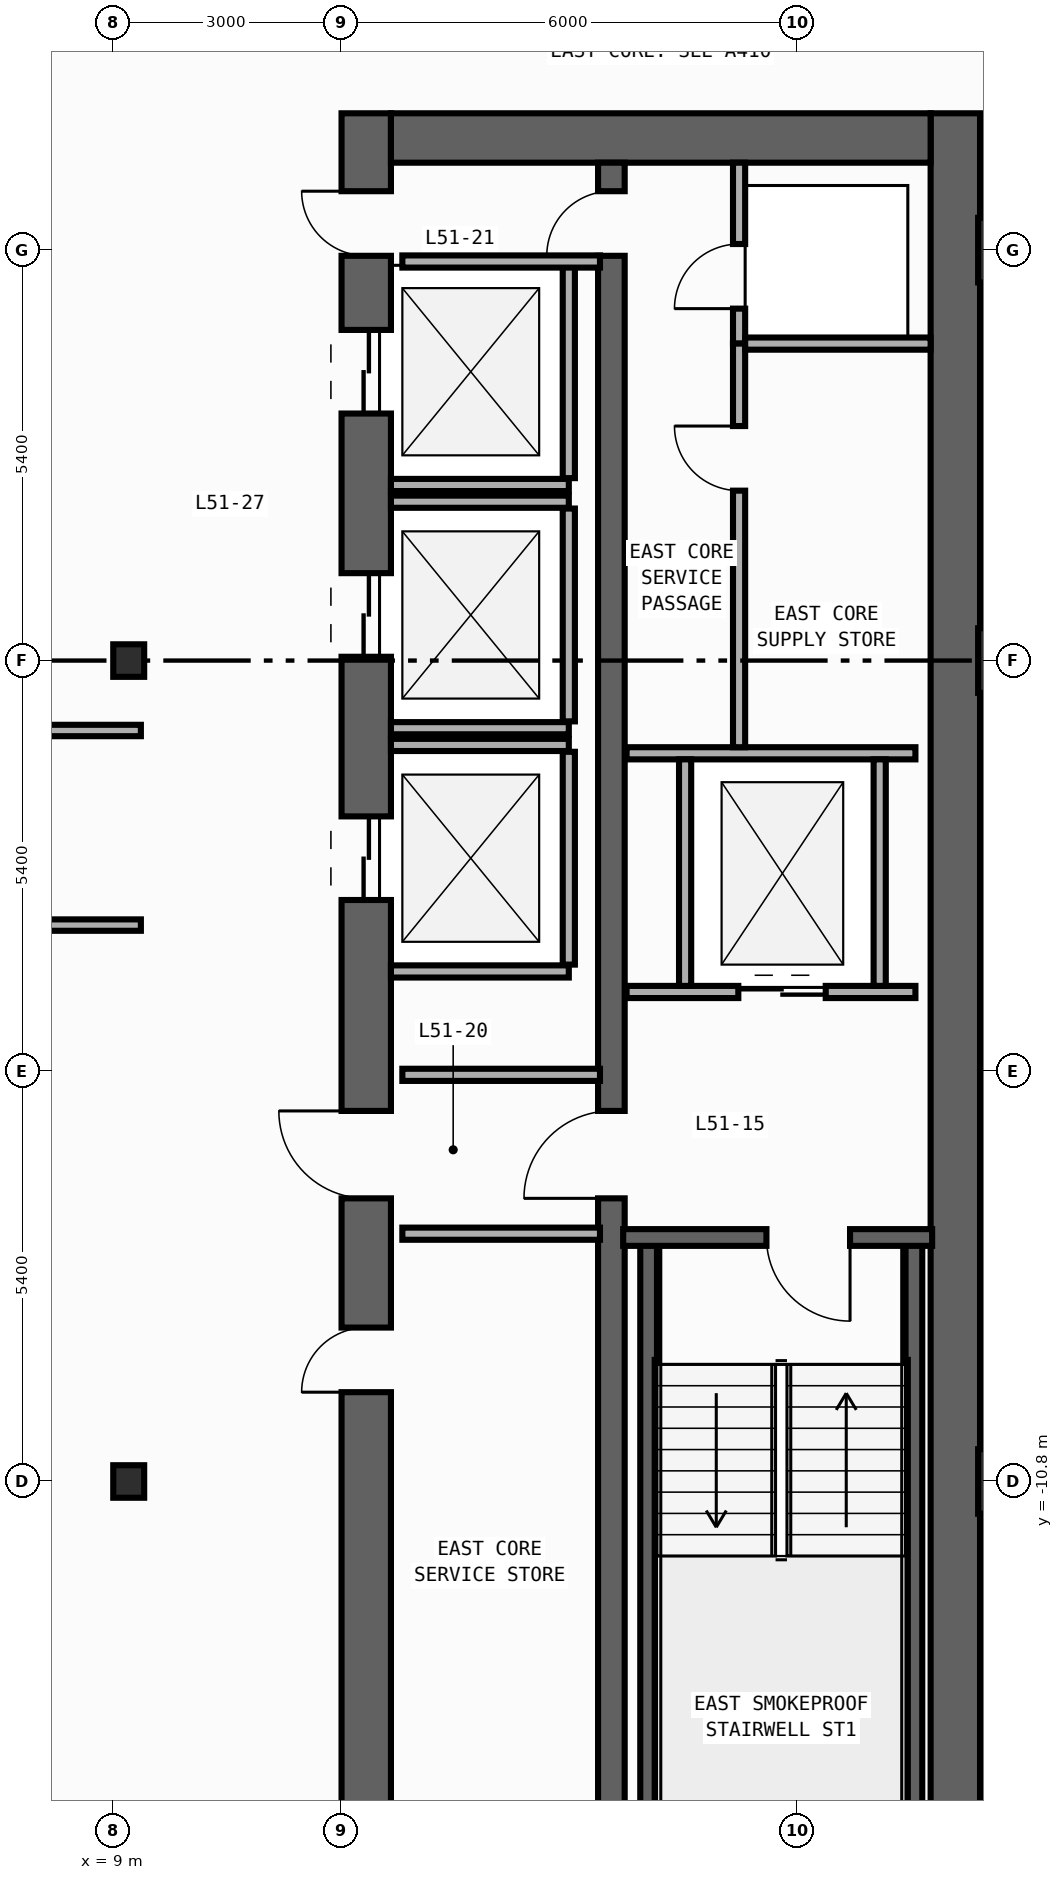
"""IFC4 building model, lengths in metres.
Left out: names, types, materials, properties, quantities, classifications, styles, units other than length and angle.
Written with IfcOpenShell. Run it as: python <this file> out.ifc"""

import sys

from ifc_helpers import new_model, si_unit, direction, frame, frame_2d, origin, origin_2d, place, context, subcontext, project, spatial, rectangle, i_section, extrude, element, fill, save


model = new_model("IFC4")
c1 = context("Model", 3, precision=1e-05, world=origin(), true_north=direction((0.0, 1.0)))
c2 = subcontext(c1, "Body", "Model", "MODEL_VIEW")
j1 = project(units=[si_unit("LENGTHUNIT", "METRE"), si_unit("PLANEANGLEUNIT", "RADIAN")], contexts=[c1])
p1 = place(None, origin())
s1 = spatial("IfcSite", under=j1, at=p1, CompositionType="ELEMENT")
p2 = place(p1, origin())
s2 = spatial("IfcBuilding", under=s1, at=p2, CompositionType="ELEMENT")
p3 = place(p2, frame((0.0, 0.0, 222.4)))
s3 = spatial("IfcBuildingStorey", under=s2, at=p3, CompositionType="ELEMENT", Elevation=222.4)
p4 = place(p3, frame((12.325, -19.8, 0.0), z_axis=(0.0, 0.0, 1.0), x_axis=(0.0, 1.0, 0.0)))
e1 = element("IfcWall", 1, at=p4, inside=s3, PredefinedType="SHEAR", context=c2, shape_type="SweptSolid", body=[
    extrude(rectangle(XDim=27.0, YDim=0.65, at=frame_2d((13.5, 0.0))), origin(), (0.0, 0.0, 1.0), 3.34),
])
p5 = place(p4, frame((23.05, 0.0, 0.0)))
e2 = element("IfcOpeningElement", 2, at=p5, cuts=e1, PredefinedType="OPENING", context=c2, shape_type="SweptSolid", body=[
    extrude(rectangle(XDim=1.1, YDim=2.2, at=frame_2d((0.55, 1.1))), frame((0.0, 0.335, 0.0), z_axis=(0.0, -1.0, 0.0), x_axis=(1.0, 0.0, 0.0)), (0.0, 0.0, 1.0), 0.67),
])
p6 = place(p4, frame((19.85, 0.0, 0.0)))
e3 = element("IfcOpeningElement", 3, at=p6, cuts=e1, PredefinedType="OPENING", context=c2, shape_type="SweptSolid", body=[
    extrude(rectangle(XDim=1.1, YDim=2.2, at=frame_2d((0.55, 1.1))), frame((0.0, 0.335, 0.0), z_axis=(0.0, -1.0, 0.0), x_axis=(1.0, 0.0, 0.0)), (0.0, 0.0, 1.0), 0.67),
])
p7 = place(p4, frame((16.65, 0.0, 0.0)))
e4 = element("IfcOpeningElement", 4, at=p7, cuts=e1, PredefinedType="OPENING", context=c2, shape_type="SweptSolid", body=[
    extrude(rectangle(XDim=1.1, YDim=2.2, at=frame_2d((0.55, 1.1))), frame((0.0, 0.335, 0.0), z_axis=(0.0, -1.0, 0.0), x_axis=(1.0, 0.0, 0.0)), (0.0, 0.0, 1.0), 0.67),
])
p8 = place(p4, frame((10.175, 0.0, 0.0)))
e5 = element("IfcOpeningElement", 5, at=p8, cuts=e1, PredefinedType="OPENING", context=c2, shape_type="SweptSolid", body=[
    extrude(rectangle(XDim=0.85, YDim=2.1, at=frame_2d((0.425, 1.05))), frame((0.0, 0.335, 0.0), z_axis=(0.0, -1.0, 0.0), x_axis=(1.0, 0.0, 0.0)), (0.0, 0.0, 1.0), 0.67),
])
p9 = place(p4, frame((12.725, 0.0, 0.0)))
e6 = element("IfcOpeningElement", 6, at=p9, cuts=e1, PredefinedType="OPENING", context=c2, shape_type="SweptSolid", body=[
    extrude(rectangle(XDim=1.15, YDim=2.2, at=frame_2d((0.575, 1.1))), frame((0.0, 0.335, 0.0), z_axis=(0.0, -1.0, 0.0), x_axis=(1.0, 0.0, 0.0)), (0.0, 0.0, 1.0), 0.67),
])
p10 = place(p4, frame((25.125, 0.0, 0.0)))
e7 = element("IfcOpeningElement", 7, at=p10, cuts=e1, PredefinedType="OPENING", context=c2, shape_type="SweptSolid", body=[
    extrude(rectangle(XDim=0.85, YDim=2.1, at=frame_2d((0.425, 1.05))), frame((0.0, 0.335, 0.0), z_axis=(0.0, -1.0, 0.0), x_axis=(1.0, 0.0, 0.0)), (0.0, 0.0, 1.0), 0.67),
])
p11 = place(p3, frame((20.075, -19.8, 0.0), z_axis=(0.0, 0.0, 1.0), x_axis=(0.0, 1.0, 0.0)))
e8 = element("IfcWall", 8, at=p11, inside=s3, PredefinedType="SHEAR", context=c2, shape_type="SweptSolid", body=[
    extrude(rectangle(XDim=27.0, YDim=0.65, at=frame_2d((13.5, 0.0))), origin(), (0.0, 0.0, 1.0), 3.34),
])
p12 = place(p3, frame((12.65, 6.875, 0.0), z_axis=(0.0, 0.0, 1.0), x_axis=(1.0, 0.0, 0.0)))
e9 = element("IfcWall", 9, at=p12, inside=s3, PredefinedType="SHEAR", context=c2, shape_type="SweptSolid", body=[
    extrude(rectangle(XDim=7.1, YDim=0.65, at=frame_2d((3.55, 0.0))), origin(), (0.0, 0.0, 1.0), 3.34),
])
p13 = place(p3, frame((15.55, -19.15, 0.0), z_axis=(0.0, 0.0, 1.0), x_axis=(0.0, 1.0, 0.0)))
e10 = element("IfcWall", 10, at=p13, inside=s3, PredefinedType="SHEAR", context=c2, shape_type="SweptSolid", body=[
    extrude(rectangle(XDim=25.7, YDim=0.35, at=frame_2d((12.85, 0.0))), origin(), (0.0, 0.0, 1.0), 3.34),
])
p14 = place(p13, frame((12.075, 0.0, 0.0)))
e11 = element("IfcOpeningElement", 11, at=p14, cuts=e10, PredefinedType="OPENING", context=c2, shape_type="SweptSolid", body=[
    extrude(rectangle(XDim=1.15, YDim=2.2, at=frame_2d((0.575, 1.1))), frame((0.0, 0.185, 0.0), z_axis=(0.0, -1.0, 0.0), x_axis=(1.0, 0.0, 0.0)), (0.0, 0.0, 1.0), 0.37),
])
p15 = place(p13, frame((24.475, 0.0, 0.0)))
e12 = element("IfcOpeningElement", 12, at=p15, cuts=e10, PredefinedType="OPENING", context=c2, shape_type="SweptSolid", body=[
    extrude(rectangle(XDim=0.85, YDim=2.1, at=frame_2d((0.425, 1.05))), frame((0.0, 0.185, 0.0), z_axis=(0.0, -1.0, 0.0), x_axis=(1.0, 0.0, 0.0)), (0.0, 0.0, 1.0), 0.37),
])
for number, where, z_axis, x_axis in (
    (13, (16.04, -19.01, 0.0), (0.0, 0.0, 1.0), (0.0, 1.0, 0.0)),
    (14, (19.53, -19.01, 0.0), (0.0, 0.0, 1.0), (0.0, 1.0, 0.0)),
):
    element("IfcWall", number, at=place(p3, frame(where, z_axis=z_axis, x_axis=x_axis)), inside=s3, PredefinedType="SHEAR", context=c2, shape_type="SweptSolid", body=[
        extrude(rectangle(XDim=11.42, YDim=0.22, at=frame_2d((5.71, 0.0))), origin(), (0.0, 0.0, 1.0), 3.34),
    ])
p16 = place(p3, frame((19.77, -7.59, 0.0), z_axis=(0.0, 0.0, 1.0), x_axis=(-1.0, 0.0, 0.0)))
e15 = element("IfcWall", 15, at=p16, inside=s3, PredefinedType="SHEAR", context=c2, shape_type="SweptSolid", body=[
    extrude(rectangle(XDim=4.065, YDim=0.22, at=frame_2d((2.032, 0.0))), origin(), (0.0, 0.0, 1.0), 3.34),
])
p17 = place(p16, frame((1.08, 0.0, 0.0)))
e16 = element("IfcOpeningElement", 16, at=p17, cuts=e15, PredefinedType="OPENING", context=c2, shape_type="SweptSolid", body=[
    extrude(rectangle(XDim=1.1, YDim=2.2, at=frame_2d((0.55, 1.1))), frame((0.0, 0.12, 0.0), z_axis=(0.0, -1.0, 0.0), x_axis=(1.0, 0.0, 0.0)), (0.0, 0.0, 1.0), 0.24),
])
for number, where, z_axis, x_axis in (
    (17, (9.2, -10.8, 0.0), (0.0, 0.0, 1.0), (1.0, 0.0, 0.0)),
    (18, (9.2, 0.0, 0.0), (0.0, 0.0, 1.0), (1.0, 0.0, 0.0)),
):
    element("IfcColumn", number, at=place(p3, frame(where, z_axis=z_axis, x_axis=x_axis)), inside=s3, PredefinedType="COLUMN", context=c2, shape_type="SweptSolid", body=[
        extrude(i_section(OverallWidth=0.407, OverallDepth=0.428, WebThickness=0.02, FlangeThickness=0.035, FilletRadius=0.022, at=origin_2d()), origin(), (0.0, 0.0, 1.0), 3.6),
    ])
for number, where, z_axis, x_axis in (
    (19, (20.8, -10.8, 0.0), (0.0, 0.0, 1.0), (1.0, 0.0, 0.0)),
    (20, (20.8, 0.0, 0.0), (0.0, 0.0, 1.0), (1.0, 0.0, 0.0)),
    (21, (20.8, 5.4, 0.0), (0.0, 0.0, 1.0), (1.0, 0.0, 0.0)),
):
    element("IfcColumn", number, at=place(p3, frame(where, z_axis=z_axis, x_axis=x_axis)), inside=s3, PredefinedType="COLUMN", context=c2, shape_type="SweptSolid", body=[
        extrude(rectangle(XDim=0.85, YDim=0.85, at=origin_2d()), origin(), (0.0, 0.0, 1.0), 3.6),
    ])
p18 = place(p3, frame((12.65, 2.31, 0.0), z_axis=(0.0, 0.0, 1.0), x_axis=(1.0, 0.0, 0.0)))
e22 = element("IfcWall", 22, at=p18, inside=s3, PredefinedType="STANDARD", context=c2, shape_type="SweptSolid", body=[
    extrude(rectangle(XDim=2.34, YDim=0.16, at=frame_2d((1.17, 0.0))), origin(), (0.0, 0.0, 1.0), 3.34),
])
p19 = place(p3, frame((14.99, 2.4, 0.0), z_axis=(0.0, 0.0, 1.0), x_axis=(0.0, 1.0, 0.0)))
e23 = element("IfcWall", 23, at=p19, inside=s3, PredefinedType="STANDARD", context=c2, shape_type="SweptSolid", body=[
    extrude(rectangle(XDim=2.8, YDim=0.16, at=frame_2d((1.4, 0.0))), origin(), (0.0, 0.0, 1.0), 3.34),
])
for number, where, z_axis, x_axis in (
    (24, (12.65, -0.89, 0.0), (0.0, 0.0, 1.0), (1.0, 0.0, 0.0)),
    (25, (12.65, 2.09, 0.0), (0.0, 0.0, 1.0), (1.0, 0.0, 0.0)),
):
    element("IfcWall", number, at=place(p3, frame(where, z_axis=z_axis, x_axis=x_axis)), inside=s3, PredefinedType="STANDARD", context=c2, shape_type="SweptSolid", body=[
        extrude(rectangle(XDim=2.34, YDim=0.16, at=frame_2d((1.17, 0.0))), origin(), (0.0, 0.0, 1.0), 3.34),
    ])
p20 = place(p3, frame((14.99, -0.8, 0.0), z_axis=(0.0, 0.0, 1.0), x_axis=(0.0, 1.0, 0.0)))
e26 = element("IfcWall", 26, at=p20, inside=s3, PredefinedType="STANDARD", context=c2, shape_type="SweptSolid", body=[
    extrude(rectangle(XDim=2.8, YDim=0.16, at=frame_2d((1.4, 0.0))), origin(), (0.0, 0.0, 1.0), 3.34),
])
for number, where, z_axis, x_axis in (
    (27, (12.65, -4.09, 0.0), (0.0, 0.0, 1.0), (1.0, 0.0, 0.0)),
    (28, (12.65, -1.11, 0.0), (0.0, 0.0, 1.0), (1.0, 0.0, 0.0)),
):
    element("IfcWall", number, at=place(p3, frame(where, z_axis=z_axis, x_axis=x_axis)), inside=s3, PredefinedType="STANDARD", context=c2, shape_type="SweptSolid", body=[
        extrude(rectangle(XDim=2.34, YDim=0.16, at=frame_2d((1.17, 0.0))), origin(), (0.0, 0.0, 1.0), 3.34),
    ])
p21 = place(p3, frame((14.99, -4.0, 0.0), z_axis=(0.0, 0.0, 1.0), x_axis=(0.0, 1.0, 0.0)))
e29 = element("IfcWall", 29, at=p21, inside=s3, PredefinedType="STANDARD", context=c2, shape_type="SweptSolid", body=[
    extrude(rectangle(XDim=2.8, YDim=0.16, at=frame_2d((1.4, 0.0))), origin(), (0.0, 0.0, 1.0), 3.34),
])
p22 = place(p3, frame((15.75, -4.36, 0.0), z_axis=(0.0, 0.0, 1.0), x_axis=(1.0, 0.0, 0.0)))
e30 = element("IfcWall", 30, at=p22, inside=s3, PredefinedType="STANDARD", context=c2, shape_type="SweptSolid", body=[
    extrude(rectangle(XDim=3.8, YDim=0.16, at=frame_2d((1.9, 0.0))), origin(), (0.0, 0.0, 1.0), 3.34),
])
p23 = place(p22, frame((1.47, 0.0, 0.0)))
e31 = element("IfcOpeningElement", 31, at=p23, cuts=e30, PredefinedType="OPENING", context=c2, shape_type="SweptSolid", body=[
    extrude(rectangle(XDim=1.15, YDim=2.2, at=frame_2d((0.575, 1.1))), frame((0.0, 0.09, 0.0), z_axis=(0.0, -1.0, 0.0), x_axis=(1.0, 0.0, 0.0)), (0.0, 0.0, 1.0), 0.18),
])
p24 = place(p3, frame((15.75, -1.22, 0.0), z_axis=(0.0, 0.0, 1.0), x_axis=(1.0, 0.0, 0.0)))
e32 = element("IfcWall", 32, at=p24, inside=s3, PredefinedType="STANDARD", context=c2, shape_type="SweptSolid", body=[
    extrude(rectangle(XDim=3.8, YDim=0.16, at=frame_2d((1.9, 0.0))), origin(), (0.0, 0.0, 1.0), 3.34),
])
for number, where, z_axis, x_axis in (
    (33, (16.52, -4.28, 0.0), (0.0, 0.0, 1.0), (0.0, 1.0, 0.0)),
    (34, (19.08, -4.28, 0.0), (0.0, 0.0, 1.0), (0.0, 1.0, 0.0)),
):
    element("IfcWall", number, at=place(p3, frame(where, z_axis=z_axis, x_axis=x_axis)), inside=s3, PredefinedType="STANDARD", context=c2, shape_type="SweptSolid", body=[
        extrude(rectangle(XDim=2.98, YDim=0.16, at=frame_2d((1.49, 0.0))), origin(), (0.0, 0.0, 1.0), 3.34),
    ])
for number, where, z_axis, x_axis in (
    (35, (12.8, -5.45, 0.0), (0.0, 0.0, 1.0), (1.0, 0.0, 0.0)),
    (36, (12.8, -7.54, 0.0), (0.0, 0.0, 1.0), (1.0, 0.0, 0.0)),
    (37, (12.8, 5.25, 0.0), (0.0, 0.0, 1.0), (1.0, 0.0, 0.0)),
):
    element("IfcWall", number, at=place(p3, frame(where, z_axis=z_axis, x_axis=x_axis)), inside=s3, PredefinedType="STANDARD", context=c2, shape_type="SweptSolid", body=[
        extrude(rectangle(XDim=2.6, YDim=0.16, at=frame_2d((1.3, 0.0))), origin(), (0.0, 0.0, 1.0), 3.34),
    ])
p25 = place(p3, frame((17.23, 4.17, 0.0), z_axis=(0.0, 0.0, 1.0), x_axis=(0.0, 1.0, 0.0)))
e38 = element("IfcWall", 38, at=p25, inside=s3, PredefinedType="PARTITIONING", context=c2, shape_type="SweptSolid", body=[
    extrude(rectangle(XDim=2.38, YDim=0.16, at=frame_2d((1.19, 0.0))), origin(), (0.0, 0.0, 1.0), 3.34),
])
p26 = place(p25, frame((0.46, 0.0, 0.0)))
e39 = element("IfcOpeningElement", 39, at=p26, cuts=e38, PredefinedType="OPENING", context=c2, shape_type="SweptSolid", body=[
    extrude(rectangle(XDim=0.85, YDim=2.1, at=frame_2d((0.425, 1.05))), frame((0.0, 0.09, 0.0), z_axis=(0.0, -1.0, 0.0), x_axis=(1.0, 0.0, 0.0)), (0.0, 0.0, 1.0), 0.18),
])
p27 = place(p3, frame((17.23, -1.14, 0.0), z_axis=(0.0, 0.0, 1.0), x_axis=(0.0, 1.0, 0.0)))
e40 = element("IfcWall", 40, at=p27, inside=s3, PredefinedType="PARTITIONING", context=c2, shape_type="SweptSolid", body=[
    extrude(rectangle(XDim=5.31, YDim=0.16, at=frame_2d((2.655, 0.0))), origin(), (0.0, 0.0, 1.0), 3.34),
])
p28 = place(p27, frame((3.375, 0.0, 0.0)))
e41 = element("IfcOpeningElement", 41, at=p28, cuts=e40, PredefinedType="OPENING", context=c2, shape_type="SweptSolid", body=[
    extrude(rectangle(XDim=0.85, YDim=2.1, at=frame_2d((0.425, 1.05))), frame((0.0, 0.09, 0.0), z_axis=(0.0, -1.0, 0.0), x_axis=(1.0, 0.0, 0.0)), (0.0, 0.0, 1.0), 0.18),
])
p29 = place(p3, frame((17.31, 4.17, 0.0), z_axis=(0.0, 0.0, 1.0), x_axis=(1.0, 0.0, 0.0)))
e42 = element("IfcWall", 42, at=p29, inside=s3, PredefinedType="PARTITIONING", context=c2, shape_type="SweptSolid", body=[
    extrude(rectangle(XDim=2.44, YDim=0.16, at=frame_2d((1.22, 0.0))), origin(), (0.0, 0.0, 1.0), 3.34),
])
p30 = place(p3, frame((-9.085, -0.92, 0.0), z_axis=(0.0, 0.0, 1.0), x_axis=(1.0, 0.0, 0.0)))
e43 = element("IfcWall", 43, at=p30, inside=s3, PredefinedType="PARTITIONING", context=c2, shape_type="SweptSolid", body=[
    extrude(rectangle(XDim=18.445, YDim=0.15, at=frame_2d((9.223, 0.0))), origin(), (0.0, 0.0, 1.0), 3.34),
])
p31 = place(p30, frame((8.672, 0.0, 0.0)))
e44 = element("IfcOpeningElement", 44, at=p31, cuts=e43, PredefinedType="OPENING", context=c2, shape_type="SweptSolid", body=[
    extrude(rectangle(XDim=0.9, YDim=2.15, at=frame_2d((0.45, 1.075))), frame((0.0, 0.085, 0.0), z_axis=(0.0, -1.0, 0.0), x_axis=(1.0, 0.0, 0.0)), (0.0, 0.0, 1.0), 0.17),
])
p32 = place(p3, frame((2.48, -3.48, 0.0), z_axis=(0.0, 0.0, 1.0), x_axis=(1.0, 0.0, 0.0)))
e45 = element("IfcWall", 45, at=p32, inside=s3, PredefinedType="PARTITIONING", context=c2, shape_type="SweptSolid", body=[
    extrude(rectangle(XDim=6.88, YDim=0.15, at=frame_2d((3.44, 0.0))), origin(), (0.0, 0.0, 1.0), 3.34),
])
p33 = place(p32, frame((0.46, 0.0, 0.0)))
e46 = element("IfcOpeningElement", 46, at=p33, cuts=e45, PredefinedType="OPENING", context=c2, shape_type="SweptSolid", body=[
    extrude(rectangle(XDim=0.9, YDim=2.15, at=frame_2d((0.45, 1.075))), frame((0.0, 0.085, 0.0), z_axis=(0.0, -1.0, 0.0), x_axis=(1.0, 0.0, 0.0)), (0.0, 0.0, 1.0), 0.17),
])
p34 = place(p17, origin())
e47 = element("IfcDoor", 47, at=p34, inside=s3, OperationType="SINGLE_SWING_LEFT", PredefinedType="DOOR", context=c2, shape_type="SweptSolid", body=[
    extrude(rectangle(XDim=1.1, YDim=2.2, at=frame_2d((0.55, 1.1))), frame((0.0, 0.025, 0.0), z_axis=(0.0, -1.0, 0.0), x_axis=(1.0, 0.0, 0.0)), (0.0, 0.0, 1.0), 0.05),
])
fill(e16, e47)
p35 = place(p5, origin())
e48 = element("IfcDoor", 48, at=p35, inside=s3, OperationType="DOUBLE_DOOR_SLIDING", PredefinedType="DOOR", context=c2, shape_type="SweptSolid", body=[
    extrude(rectangle(XDim=1.1, YDim=2.2, at=frame_2d((0.55, 1.1))), frame((0.0, 0.025, 0.0), z_axis=(0.0, -1.0, 0.0), x_axis=(1.0, 0.0, 0.0)), (0.0, 0.0, 1.0), 0.05),
])
fill(e2, e48)
p36 = place(p6, origin())
e49 = element("IfcDoor", 49, at=p36, inside=s3, OperationType="DOUBLE_DOOR_SLIDING", PredefinedType="DOOR", context=c2, shape_type="SweptSolid", body=[
    extrude(rectangle(XDim=1.1, YDim=2.2, at=frame_2d((0.55, 1.1))), frame((0.0, 0.025, 0.0), z_axis=(0.0, -1.0, 0.0), x_axis=(1.0, 0.0, 0.0)), (0.0, 0.0, 1.0), 0.05),
])
fill(e3, e49)
p37 = place(p7, origin())
e50 = element("IfcDoor", 50, at=p37, inside=s3, OperationType="DOUBLE_DOOR_SLIDING", PredefinedType="DOOR", context=c2, shape_type="SweptSolid", body=[
    extrude(rectangle(XDim=1.1, YDim=2.2, at=frame_2d((0.55, 1.1))), frame((0.0, 0.025, 0.0), z_axis=(0.0, -1.0, 0.0), x_axis=(1.0, 0.0, 0.0)), (0.0, 0.0, 1.0), 0.05),
])
fill(e4, e50)
p38 = place(p8, origin())
e51 = element("IfcDoor", 51, at=p38, inside=s3, OperationType="SINGLE_SWING_LEFT", PredefinedType="DOOR", context=c2, shape_type="SweptSolid", body=[
    extrude(rectangle(XDim=0.85, YDim=2.1, at=frame_2d((0.425, 1.05))), frame((0.0, 0.025, 0.0), z_axis=(0.0, -1.0, 0.0), x_axis=(1.0, 0.0, 0.0)), (0.0, 0.0, 1.0), 0.05),
])
fill(e5, e51)
p39 = place(p9, origin())
e52 = element("IfcDoor", 52, at=p39, inside=s3, OperationType="SINGLE_SWING_RIGHT", PredefinedType="DOOR", context=c2, shape_type="SweptSolid", body=[
    extrude(rectangle(XDim=1.15, YDim=2.2, at=frame_2d((0.575, 1.1))), frame((0.0, 0.025, 0.0), z_axis=(0.0, -1.0, 0.0), x_axis=(1.0, 0.0, 0.0)), (0.0, 0.0, 1.0), 0.05),
])
fill(e6, e52)
p40 = place(p14, origin())
e53 = element("IfcDoor", 53, at=p40, inside=s3, OperationType="SINGLE_SWING_LEFT", PredefinedType="DOOR", context=c2, shape_type="SweptSolid", body=[
    extrude(rectangle(XDim=1.15, YDim=2.2, at=frame_2d((0.575, 1.1))), frame((0.0, 0.025, 0.0), z_axis=(0.0, -1.0, 0.0), x_axis=(1.0, 0.0, 0.0)), (0.0, 0.0, 1.0), 0.05),
])
fill(e11, e53)
p41 = place(p10, origin())
e54 = element("IfcDoor", 54, at=p41, inside=s3, OperationType="SINGLE_SWING_RIGHT", PredefinedType="DOOR", context=c2, shape_type="SweptSolid", body=[
    extrude(rectangle(XDim=0.85, YDim=2.1, at=frame_2d((0.425, 1.05))), frame((0.0, 0.025, 0.0), z_axis=(0.0, -1.0, 0.0), x_axis=(1.0, 0.0, 0.0)), (0.0, 0.0, 1.0), 0.05),
])
fill(e7, e54)
p42 = place(p15, origin())
e55 = element("IfcDoor", 55, at=p42, inside=s3, OperationType="SINGLE_SWING_LEFT", PredefinedType="DOOR", context=c2, shape_type="SweptSolid", body=[
    extrude(rectangle(XDim=0.85, YDim=2.1, at=frame_2d((0.425, 1.05))), frame((0.0, 0.025, 0.0), z_axis=(0.0, -1.0, 0.0), x_axis=(1.0, 0.0, 0.0)), (0.0, 0.0, 1.0), 0.05),
])
fill(e12, e55)
p43 = place(p23, origin())
e56 = element("IfcDoor", 56, at=p43, inside=s3, OperationType="DOUBLE_DOOR_SLIDING", PredefinedType="DOOR", context=c2, shape_type="SweptSolid", body=[
    extrude(rectangle(XDim=1.15, YDim=2.2, at=frame_2d((0.575, 1.1))), frame((0.0, 0.025, 0.0), z_axis=(0.0, -1.0, 0.0), x_axis=(1.0, 0.0, 0.0)), (0.0, 0.0, 1.0), 0.05),
])
fill(e31, e56)
p44 = place(p26, origin())
e57 = element("IfcDoor", 57, at=p44, inside=s3, OperationType="SINGLE_SWING_LEFT", PredefinedType="DOOR", context=c2, shape_type="SweptSolid", body=[
    extrude(rectangle(XDim=0.85, YDim=2.1, at=frame_2d((0.425, 1.05))), frame((0.0, 0.025, 0.0), z_axis=(0.0, -1.0, 0.0), x_axis=(1.0, 0.0, 0.0)), (0.0, 0.0, 1.0), 0.05),
])
fill(e39, e57)
p45 = place(p28, origin())
e58 = element("IfcDoor", 58, at=p45, inside=s3, OperationType="SINGLE_SWING_RIGHT", PredefinedType="DOOR", context=c2, shape_type="SweptSolid", body=[
    extrude(rectangle(XDim=0.85, YDim=2.1, at=frame_2d((0.425, 1.05))), frame((0.0, 0.025, 0.0), z_axis=(0.0, -1.0, 0.0), x_axis=(1.0, 0.0, 0.0)), (0.0, 0.0, 1.0), 0.05),
])
fill(e41, e58)
save(model, sys.argv[1])
